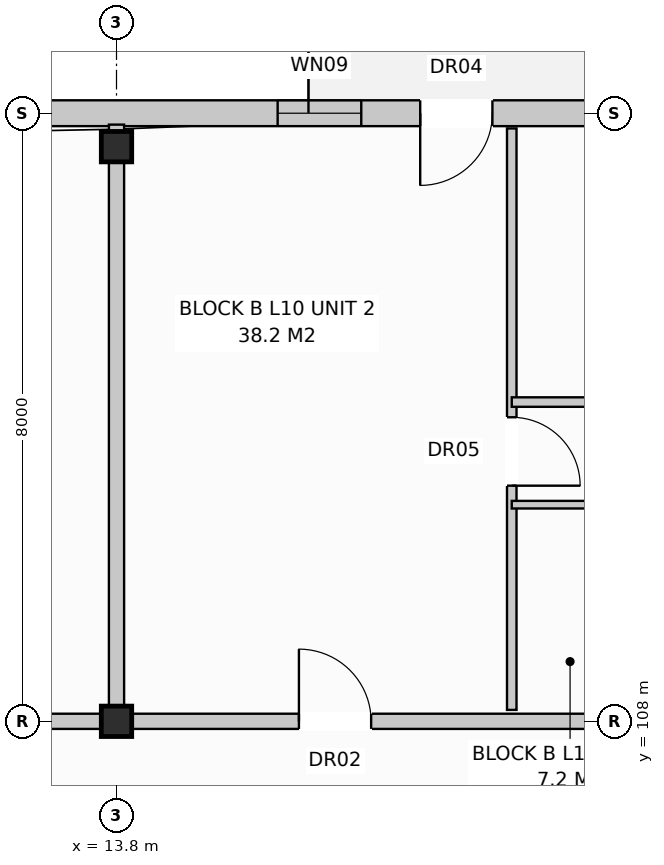
"""IFC4 building model, lengths in metres.
Left out: names, types, materials, properties, quantities, classifications, styles, units other than length and angle.
Written with IfcOpenShell. Run it as: python <this file> out.ifc"""

import sys

from ifc_helpers import new_model, si_unit, direction, frame, frame_2d, origin, origin_with_axes, origin_2d, place, context, subcontext, project, spatial, rectangle, extrude, element, fill, save


model = new_model("IFC4")
c1 = context("Model", 3, precision=1e-05, world=origin(), true_north=direction((0.0, 1.0)))
c2 = subcontext(c1, "Body", "Model", "MODEL_VIEW")
j1 = project(units=[si_unit("LENGTHUNIT", "METRE"), si_unit("PLANEANGLEUNIT", "RADIAN")], contexts=[c1])
p1 = place(None, origin())
s1 = spatial("IfcSite", under=j1, at=p1, CompositionType="ELEMENT")
p2 = place(p1, origin())
s2 = spatial("IfcBuilding", under=s1, at=p2, CompositionType="ELEMENT")
p3 = place(p2, frame((0.0, 0.0, 33.6)))
s3 = spatial("IfcBuildingStorey", under=s2, at=p3, CompositionType="ELEMENT", Elevation=33.6)
for number, where, z_axis, x_axis in (
    (1, (13.8, 108.0, 0.0), (0.0, 0.0, 1.0), (1.0, 0.0, 0.0)),
    (2, (13.8, 115.56, 0.0), (0.0, 0.0, 1.0), (1.0, 0.0, 0.0)),
):
    element("IfcColumn", number, at=place(p3, frame(where, z_axis=z_axis, x_axis=x_axis)), inside=s3, PredefinedType="COLUMN", context=c2, shape_type="SweptSolid", body=[
        extrude(rectangle(XDim=0.4, YDim=0.4, at=origin_2d()), origin(), (0.0, 0.0, 1.0), 3.2),
    ])
p4 = place(p3, frame((0.16, 116.0, 0.0), z_axis=(0.0, 0.0, 1.0), x_axis=(1.0, 0.0, 0.0)))
e3 = element("IfcWall", 3, at=p4, inside=s3, PredefinedType="STANDARD", context=c2, shape_type="SweptSolid", body=[
    extrude(rectangle(XDim=41.08, YDim=0.34, at=frame_2d((20.54, 0.0))), origin(), (0.0, 0.0, 1.0), 2.96),
])
p5 = place(p4, frame((2.835, 0.0, 0.0)))
e4 = element("IfcOpeningElement", 4, at=p5, cuts=e3, PredefinedType="OPENING", context=c2, shape_type="SweptSolid", body=[
    extrude(rectangle(XDim=0.95, YDim=2.1, at=frame_2d((0.475, 1.05))), frame((0.0, 0.182, 0.0), z_axis=(0.0, -1.0, 0.0), x_axis=(1.0, 0.0, 0.0)), (0.0, 0.0, 1.0), 0.364),
])
p6 = place(p4, frame((17.635, 0.0, 0.0)))
e5 = element("IfcOpeningElement", 5, at=p6, cuts=e3, PredefinedType="OPENING", context=c2, shape_type="SweptSolid", body=[
    extrude(rectangle(XDim=0.95, YDim=2.1, at=frame_2d((0.475, 1.05))), frame((0.0, 0.182, 0.0), z_axis=(0.0, -1.0, 0.0), x_axis=(1.0, 0.0, 0.0)), (0.0, 0.0, 1.0), 0.364),
])
p7 = place(p4, frame((30.135, 0.0, 0.0)))
e6 = element("IfcOpeningElement", 6, at=p7, cuts=e3, PredefinedType="OPENING", context=c2, shape_type="SweptSolid", body=[
    extrude(rectangle(XDim=0.95, YDim=2.1, at=frame_2d((0.475, 1.05))), frame((0.0, 0.182, 0.0), z_axis=(0.0, -1.0, 0.0), x_axis=(1.0, 0.0, 0.0)), (0.0, 0.0, 1.0), 0.364),
])
p8 = place(p4, frame((0.66, 0.0, 0.8)))
e7 = element("IfcOpeningElement", 7, at=p8, cuts=e3, PredefinedType="OPENING", context=c2, shape_type="SweptSolid", body=[
    extrude(rectangle(XDim=1.9, YDim=1.85, at=frame_2d((0.95, 0.925))), frame((0.0, 0.182, 0.0), z_axis=(0.0, -1.0, 0.0), x_axis=(1.0, 0.0, 0.0)), (0.0, 0.0, 1.0), 0.364),
])
p9 = place(p4, frame((4.335, 0.0, 0.8)))
e8 = element("IfcOpeningElement", 8, at=p9, cuts=e3, PredefinedType="OPENING", context=c2, shape_type="SweptSolid", body=[
    extrude(rectangle(XDim=1.95, YDim=1.65, at=frame_2d((0.975, 0.825))), frame((0.0, 0.182, 0.0), z_axis=(0.0, -1.0, 0.0), x_axis=(1.0, 0.0, 0.0)), (0.0, 0.0, 1.0), 0.364),
])
p10 = place(p4, frame((10.46, 0.0, 0.72)))
e9 = element("IfcOpeningElement", 9, at=p10, cuts=e3, PredefinedType="OPENING", context=c2, shape_type="SweptSolid", body=[
    extrude(rectangle(XDim=1.1, YDim=1.5, at=frame_2d((0.55, 0.75))), frame((0.0, 0.182, 0.0), z_axis=(0.0, -1.0, 0.0), x_axis=(1.0, 0.0, 0.0)), (0.0, 0.0, 1.0), 0.364),
])
p11 = place(p4, frame((15.76, 0.0, 0.72)))
e10 = element("IfcOpeningElement", 10, at=p11, cuts=e3, PredefinedType="OPENING", context=c2, shape_type="SweptSolid", body=[
    extrude(rectangle(XDim=1.1, YDim=1.5, at=frame_2d((0.55, 0.75))), frame((0.0, 0.182, 0.0), z_axis=(0.0, -1.0, 0.0), x_axis=(1.0, 0.0, 0.0)), (0.0, 0.0, 1.0), 0.364),
])
p12 = place(p4, frame((20.992, 0.0, 0.8)))
e11 = element("IfcOpeningElement", 11, at=p12, cuts=e3, PredefinedType="OPENING", context=c2, shape_type="SweptSolid", body=[
    extrude(rectangle(XDim=1.95, YDim=1.65, at=frame_2d((0.975, 0.825))), frame((0.0, 0.182, 0.0), z_axis=(0.0, -1.0, 0.0), x_axis=(1.0, 0.0, 0.0)), (0.0, 0.0, 1.0), 0.364),
])
p13 = place(p4, frame((24.66, 0.0, 0.72)))
e12 = element("IfcOpeningElement", 12, at=p13, cuts=e3, PredefinedType="OPENING", context=c2, shape_type="SweptSolid", body=[
    extrude(rectangle(XDim=1.1, YDim=1.5, at=frame_2d((0.55, 0.75))), frame((0.0, 0.182, 0.0), z_axis=(0.0, -1.0, 0.0), x_axis=(1.0, 0.0, 0.0)), (0.0, 0.0, 1.0), 0.364),
])
p14 = place(p4, frame((27.96, 0.0, 0.8)))
e13 = element("IfcOpeningElement", 13, at=p14, cuts=e3, PredefinedType="OPENING", context=c2, shape_type="SweptSolid", body=[
    extrude(rectangle(XDim=1.9, YDim=1.85, at=frame_2d((0.95, 0.925))), frame((0.0, 0.182, 0.0), z_axis=(0.0, -1.0, 0.0), x_axis=(1.0, 0.0, 0.0)), (0.0, 0.0, 1.0), 0.364),
])
p15 = place(p4, frame((31.835, 0.0, 0.8)))
e14 = element("IfcOpeningElement", 14, at=p15, cuts=e3, PredefinedType="OPENING", context=c2, shape_type="SweptSolid", body=[
    extrude(rectangle(XDim=1.95, YDim=1.65, at=frame_2d((0.975, 0.825))), frame((0.0, 0.182, 0.0), z_axis=(0.0, -1.0, 0.0), x_axis=(1.0, 0.0, 0.0)), (0.0, 0.0, 1.0), 0.364),
])
p16 = place(p4, frame((35.41, 0.0, 0.8)))
e15 = element("IfcOpeningElement", 15, at=p16, cuts=e3, PredefinedType="OPENING", context=c2, shape_type="SweptSolid", body=[
    extrude(rectangle(XDim=1.8, YDim=1.7, at=frame_2d((0.9, 0.85))), frame((0.0, 0.182, 0.0), z_axis=(0.0, -1.0, 0.0), x_axis=(1.0, 0.0, 0.0)), (0.0, 0.0, 1.0), 0.364),
])
p17 = place(p4, frame((38.575, 0.0, 0.8)))
e16 = element("IfcOpeningElement", 16, at=p17, cuts=e3, PredefinedType="OPENING", context=c2, shape_type="SweptSolid", body=[
    extrude(rectangle(XDim=1.9, YDim=1.85, at=frame_2d((0.95, 0.925))), frame((0.0, 0.182, 0.0), z_axis=(0.0, -1.0, 0.0), x_axis=(1.0, 0.0, 0.0)), (0.0, 0.0, 1.0), 0.364),
])
p18 = place(p3, frame((13.8, 108.15, 0.0), z_axis=(0.0, 0.0, 1.0), x_axis=(0.0, 1.0, 0.0)))
e17 = element("IfcWall", 17, at=p18, inside=s3, PredefinedType="PARTITIONING", context=c2, shape_type="SweptSolid", body=[
    extrude(rectangle(XDim=7.7, YDim=0.2, at=frame_2d((3.85, 0.0))), origin(), (0.0, 0.0, 1.0), 2.96),
])
p19 = place(p3, frame((0.0, 108.0, 0.0), z_axis=(0.0, 0.0, 1.0), x_axis=(1.0, 0.0, 0.0)))
e18 = element("IfcWall", 18, at=p19, inside=s3, PredefinedType="PARTITIONING", context=c2, shape_type="SweptSolid", body=[
    extrude(rectangle(XDim=13.8, YDim=0.2, at=frame_2d((6.9, 0.0))), origin(), (0.0, 0.0, 1.0), 2.4),
])
p20 = place(p19, frame((9.6, 0.0, 0.0)))
e19 = element("IfcOpeningElement", 19, at=p20, cuts=e18, PredefinedType="OPENING", context=c2, shape_type="SweptSolid", body=[
    extrude(rectangle(XDim=0.95, YDim=2.15, at=frame_2d((0.475, 1.075))), frame((0.0, 0.112, 0.0), z_axis=(0.0, -1.0, 0.0), x_axis=(1.0, 0.0, 0.0)), (0.0, 0.0, 1.0), 0.224),
])
p21 = place(p3, frame((13.8, 108.0, 0.0), z_axis=(0.0, 0.0, 1.0), x_axis=(1.0, 0.0, 0.0)))
e20 = element("IfcWall", 20, at=p21, inside=s3, PredefinedType="PARTITIONING", context=c2, shape_type="SweptSolid", body=[
    extrude(rectangle(XDim=13.8, YDim=0.2, at=frame_2d((6.9, 0.0))), origin(), (0.0, 0.0, 1.0), 2.4),
])
p22 = place(p21, frame((2.4, 0.0, 0.0)))
e21 = element("IfcOpeningElement", 21, at=p22, cuts=e20, PredefinedType="OPENING", context=c2, shape_type="SweptSolid", body=[
    extrude(rectangle(XDim=0.95, YDim=2.15, at=frame_2d((0.475, 1.075))), frame((0.0, 0.112, 0.0), z_axis=(0.0, -1.0, 0.0), x_axis=(1.0, 0.0, 0.0)), (0.0, 0.0, 1.0), 0.224),
])
p23 = place(p3, frame((19.0, 108.15, 0.0), z_axis=(0.0, 0.0, 1.0), x_axis=(0.0, 1.0, 0.0)))
e22 = element("IfcWall", 22, at=p23, inside=s3, PredefinedType="PARTITIONING", context=c2, shape_type="SweptSolid", body=[
    extrude(rectangle(XDim=7.65, YDim=0.125, at=frame_2d((3.825, 0.0))), origin(), (0.0, 0.0, 1.0), 2.96),
])
p24 = place(p23, frame((2.95, 0.0, 0.0)))
e23 = element("IfcOpeningElement", 23, at=p24, cuts=e22, PredefinedType="OPENING", context=c2, shape_type="SweptSolid", body=[
    extrude(rectangle(XDim=0.9, YDim=2.1, at=frame_2d((0.45, 1.05))), frame((0.0, 0.074, 0.0), z_axis=(0.0, -1.0, 0.0), x_axis=(1.0, 0.0, 0.0)), (0.0, 0.0, 1.0), 0.149),
])
p25 = place(p3, frame((19.0, 110.85, 0.0), z_axis=(0.0, 0.0, 1.0), x_axis=(1.0, 0.0, 0.0)))
e24 = element("IfcWall", 24, at=p25, inside=s3, PredefinedType="PARTITIONING", context=c2, shape_type="SweptSolid", body=[
    extrude(rectangle(XDim=8.5, YDim=0.1, at=frame_2d((4.25, 0.0))), origin(), (0.0, 0.0, 1.0), 2.96),
])
p26 = place(p25, frame((1.0, 0.0, 0.0)))
e25 = element("IfcOpeningElement", 25, at=p26, cuts=e24, PredefinedType="OPENING", context=c2, shape_type="SweptSolid", body=[
    extrude(rectangle(XDim=0.85, YDim=2.1, at=frame_2d((0.425, 1.05))), frame((0.0, 0.062, 0.0), z_axis=(0.0, -1.0, 0.0), x_axis=(1.0, 0.0, 0.0)), (0.0, 0.0, 1.0), 0.124),
])
p27 = place(p25, frame((3.4, 0.0, 0.0)))
e26 = element("IfcOpeningElement", 26, at=p27, cuts=e24, PredefinedType="OPENING", context=c2, shape_type="SweptSolid", body=[
    extrude(rectangle(XDim=0.85, YDim=2.05, at=frame_2d((0.425, 1.025))), frame((0.0, 0.062, 0.0), z_axis=(0.0, -1.0, 0.0), x_axis=(1.0, 0.0, 0.0)), (0.0, 0.0, 1.0), 0.124),
])
p28 = place(p25, frame((6.2, 0.0, 0.0)))
e27 = element("IfcOpeningElement", 27, at=p28, cuts=e24, PredefinedType="OPENING", context=c2, shape_type="SweptSolid", body=[
    extrude(rectangle(XDim=0.85, YDim=2.05, at=frame_2d((0.425, 1.025))), frame((0.0, 0.062, 0.0), z_axis=(0.0, -1.0, 0.0), x_axis=(1.0, 0.0, 0.0)), (0.0, 0.0, 1.0), 0.124),
])
p29 = place(p3, frame((19.0, 112.2, 0.0), z_axis=(0.0, 0.0, 1.0), x_axis=(1.0, 0.0, 0.0)))
e28 = element("IfcWall", 28, at=p29, inside=s3, PredefinedType="PARTITIONING", context=c2, shape_type="SweptSolid", body=[
    extrude(rectangle(XDim=8.5, YDim=0.125, at=frame_2d((4.25, 0.0))), origin(), (0.0, 0.0, 1.0), 2.96),
])
p30 = place(p29, frame((1.5, 0.0, 0.0)))
e29 = element("IfcOpeningElement", 29, at=p30, cuts=e28, PredefinedType="OPENING", context=c2, shape_type="SweptSolid", body=[
    extrude(rectangle(XDim=0.9, YDim=2.1, at=frame_2d((0.45, 1.05))), frame((0.0, 0.074, 0.0), z_axis=(0.0, -1.0, 0.0), x_axis=(1.0, 0.0, 0.0)), (0.0, 0.0, 1.0), 0.149),
])
p31 = place(p29, frame((5.6, 0.0, 0.0)))
e30 = element("IfcOpeningElement", 30, at=p31, cuts=e28, PredefinedType="OPENING", context=c2, shape_type="SweptSolid", body=[
    extrude(rectangle(XDim=0.9, YDim=2.1, at=frame_2d((0.45, 1.05))), frame((0.0, 0.074, 0.0), z_axis=(0.0, -1.0, 0.0), x_axis=(1.0, 0.0, 0.0)), (0.0, 0.0, 1.0), 0.149),
])
p32 = place(p6, frame((0.95, 0.0, 0.0), z_axis=(0.0, 0.0, 1.0), x_axis=(-1.0, 0.0, 0.0)))
e31 = element("IfcDoor", 31, at=p32, inside=s3, OperationType="SINGLE_SWING_LEFT", PredefinedType="DOOR", context=c2, shape_type="SweptSolid", body=[
    extrude(rectangle(XDim=0.95, YDim=2.1, at=frame_2d((0.475, 1.05))), frame((0.0, 0.025, 0.0), z_axis=(0.0, -1.0, 0.0), x_axis=(1.0, 0.0, 0.0)), (0.0, 0.0, 1.0), 0.05),
])
fill(e5, e31)
p33 = place(p11, origin_with_axes())
e32 = element("IfcWindow", 32, at=p33, inside=s3, PartitioningType="SINGLE_PANEL", PredefinedType="WINDOW", context=c2, shape_type="SweptSolid", body=[
    extrude(rectangle(XDim=1.1, YDim=1.5, at=frame_2d((0.55, 0.75))), frame((0.0, 0.03, 0.0), z_axis=(0.0, -1.0, 0.0), x_axis=(1.0, 0.0, 0.0)), (0.0, 0.0, 1.0), 0.06),
])
fill(e10, e32)
p34 = place(p22, origin_with_axes())
e33 = element("IfcDoor", 33, at=p34, inside=s3, OperationType="SINGLE_SWING_LEFT", PredefinedType="DOOR", context=c2, shape_type="SweptSolid", body=[
    extrude(rectangle(XDim=0.95, YDim=2.15, at=frame_2d((0.475, 1.075))), frame((0.0, 0.025, 0.0), z_axis=(0.0, -1.0, 0.0), x_axis=(1.0, 0.0, 0.0)), (0.0, 0.0, 1.0), 0.05),
])
fill(e21, e33)
p35 = place(p24, frame((0.9, 0.0, 0.0), z_axis=(0.0, 0.0, 1.0), x_axis=(-1.0, 0.0, 0.0)))
e34 = element("IfcDoor", 34, at=p35, inside=s3, OperationType="SINGLE_SWING_LEFT", PredefinedType="DOOR", context=c2, shape_type="SweptSolid", body=[
    extrude(rectangle(XDim=0.9, YDim=2.1, at=frame_2d((0.45, 1.05))), frame((0.0, 0.025, 0.0), z_axis=(0.0, -1.0, 0.0), x_axis=(1.0, 0.0, 0.0)), (0.0, 0.0, 1.0), 0.05),
])
fill(e23, e34)
save(model, sys.argv[1])
